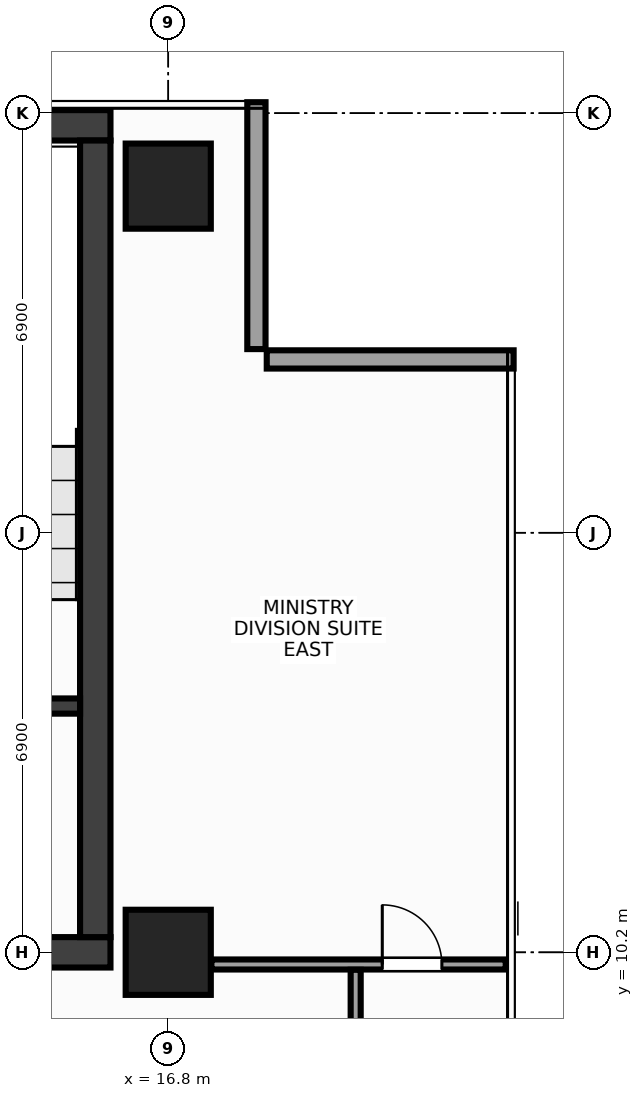
"""IFC4 building model, lengths in metres.
Left out: names, types, materials, properties, quantities, classifications, styles, units other than length and angle.
Written with IfcOpenShell. Run it as: python <this file> out.ifc"""

import sys

from ifc_helpers import new_model, si_unit, direction, frame, frame_2d, origin, origin_2d, place, context, subcontext, project, spatial, rectangle, extrude, source, transform, mapped, element, fill, save


model = new_model("IFC4")
c1 = context("Model", 3, precision=1e-05, world=origin(), true_north=direction((0.0, 1.0)))
c2 = subcontext(c1, "Body", "Model", "MODEL_VIEW")
j1 = project(units=[si_unit("LENGTHUNIT", "METRE"), si_unit("PLANEANGLEUNIT", "RADIAN")], contexts=[c1])
p1 = place(None, origin())
s1 = spatial("IfcSite", under=j1, at=p1, CompositionType="ELEMENT")
p2 = place(p1, origin())
s2 = spatial("IfcBuilding", under=s1, at=p2, CompositionType="ELEMENT")
p3 = place(p2, frame((0.0, 0.0, 261.2)))
s3 = spatial("IfcBuildingStorey", under=s2, at=p3, CompositionType="ELEMENT", Elevation=261.2)
m1 = source(origin(), c2, "Body", "SweptSolid", [
    extrude(rectangle(XDim=31.7, YDim=0.5, at=frame_2d((15.85, 0.0))), origin(), (0.0, 0.0, 1.0), 3.6),
])
p4 = place(p3, frame((-15.85, 23.8, 0.0), z_axis=(0.0, 0.0, 1.0), x_axis=(1.0, 0.0, 0.0)))
e1 = element("IfcWall", 1, at=p4, inside=s3, PredefinedType="SHEAR", context=c2, shape_type="MappedRepresentation", body=[
    mapped(m1, transform((0.0, 0.0, 0.0), x_axis=(1.0, 0.0, 0.0), y_axis=(0.0, 1.0, 0.0), z_axis=(0.0, 0.0, 1.0), scale=1.0)),
])
p5 = place(p3, frame((-15.85, 10.2, 0.0), z_axis=(0.0, 0.0, 1.0), x_axis=(1.0, 0.0, 0.0)))
e2 = element("IfcWall", 2, at=p5, inside=s3, PredefinedType="SHEAR", context=c2, shape_type="MappedRepresentation", body=[
    mapped(m1, transform((0.0, 0.0, 0.0), x_axis=(1.0, 0.0, 0.0), y_axis=(0.0, 1.0, 0.0), z_axis=(0.0, 0.0, 1.0), scale=1.0)),
])
p6 = place(p5, frame((1.7, 0.0, 0.0)))
e3 = element("IfcOpeningElement", 3, at=p6, cuts=e2, PredefinedType="OPENING", context=c2, shape_type="SweptSolid", body=[
    extrude(rectangle(XDim=1.6, YDim=2.15, at=frame_2d((0.8, 1.075))), frame((0.0, 0.262, 0.0), z_axis=(0.0, -1.0, 0.0), x_axis=(1.0, 0.0, 0.0)), (0.0, 0.0, 1.0), 0.524),
])
p7 = place(p5, frame((28.4, 0.0, 0.0)))
e4 = element("IfcOpeningElement", 4, at=p7, cuts=e2, PredefinedType="OPENING", context=c2, shape_type="SweptSolid", body=[
    extrude(rectangle(XDim=1.6, YDim=2.15, at=frame_2d((0.8, 1.075))), frame((0.0, 0.262, 0.0), z_axis=(0.0, -1.0, 0.0), x_axis=(1.0, 0.0, 0.0)), (0.0, 0.0, 1.0), 0.524),
])
p8 = place(p5, frame((15.1, 0.0, 0.0)))
e5 = element("IfcOpeningElement", 5, at=p8, cuts=e2, PredefinedType="OPENING", context=c2, shape_type="SweptSolid", body=[
    extrude(rectangle(XDim=1.5, YDim=2.2, at=frame_2d((0.75, 1.1))), frame((0.0, 0.262, 0.0), z_axis=(0.0, -1.0, 0.0), x_axis=(1.0, 0.0, 0.0)), (0.0, 0.0, 1.0), 0.524),
])
m2 = source(origin(), c2, "Body", "SweptSolid", [
    extrude(rectangle(XDim=13.1, YDim=0.5, at=frame_2d((6.55, 0.0))), origin(), (0.0, 0.0, 1.0), 3.6),
])
p9 = place(p3, frame((15.6, 10.45, 0.0), z_axis=(0.0, 0.0, 1.0), x_axis=(0.0, 1.0, 0.0)))
e6 = element("IfcWall", 6, at=p9, inside=s3, PredefinedType="SHEAR", context=c2, shape_type="MappedRepresentation", body=[
    mapped(m2, transform((0.0, 0.0, 0.0), x_axis=(1.0, 0.0, 0.0), y_axis=(0.0, 1.0, 0.0), z_axis=(0.0, 0.0, 1.0), scale=1.0)),
])
m3 = source(origin(), c2, "Body", "SweptSolid", [
    extrude(rectangle(XDim=3.705, YDim=0.25, at=frame_2d((1.853, 0.0))), origin(), (0.0, 0.0, 1.0), 3.6),
])
p10 = place(p3, frame((11.645, 14.25, 0.0), z_axis=(0.0, 0.0, 1.0), x_axis=(1.0, 0.0, 0.0)))
e7 = element("IfcWall", 7, at=p10, inside=s3, PredefinedType="SHEAR", context=c2, shape_type="MappedRepresentation", body=[
    mapped(m3, transform((0.0, 0.0, 0.0), x_axis=(1.0, 0.0, 0.0), y_axis=(0.0, 1.0, 0.0), z_axis=(0.0, 0.0, 1.0), scale=1.0)),
])
p11 = place(p10, frame((0.95, 0.0, 0.0)))
e8 = element("IfcOpeningElement", 8, at=p11, cuts=e7, PredefinedType="OPENING", context=c2, shape_type="SweptSolid", body=[
    extrude(rectangle(XDim=1.6, YDim=2.15, at=frame_2d((0.8, 1.075))), frame((0.0, 0.137, 0.0), z_axis=(0.0, -1.0, 0.0), x_axis=(1.0, 0.0, 0.0)), (0.0, 0.0, 1.0), 0.274),
])
m4 = source(origin(), c2, "Body", "SweptSolid", [
    extrude(rectangle(XDim=1.4, YDim=1.4, at=origin_2d()), origin(), (0.0, 0.0, 1.0), 3.6),
])
for number, where, z_axis, x_axis in (
    (9, (16.8, 10.2, 0.0), (0.0, 0.0, 1.0), (1.0, 0.0, 0.0)),
    (10, (16.8, 22.8, 0.0), (0.0, 0.0, 1.0), (1.0, 0.0, 0.0)),
):
    element("IfcColumn", number, at=place(p3, frame(where, z_axis=z_axis, x_axis=x_axis)), inside=s3, PredefinedType="COLUMN", context=c2, shape_type="MappedRepresentation", body=[
        mapped(m4, transform((0.0, 0.0, 0.0), x_axis=(1.0, 0.0, 0.0), y_axis=(0.0, 1.0, 0.0), z_axis=(0.0, 0.0, 1.0), scale=1.0)),
    ])
m5 = source(origin(), c2, "Body", "SweptSolid", [
    extrude(rectangle(XDim=4.06, YDim=0.3, at=frame_2d((2.03, 0.0))), origin(), (0.0, 0.0, 1.0), 2.75),
])
p12 = place(p3, frame((22.48, 19.95, 0.0), z_axis=(0.0, 0.0, 1.0), x_axis=(-1.0, 0.0, 0.0)))
e11 = element("IfcWall", 11, at=p12, inside=s3, PredefinedType="STANDARD", context=c2, shape_type="MappedRepresentation", body=[
    mapped(m5, transform((0.0, 0.0, 0.0), x_axis=(1.0, 0.0, 0.0), y_axis=(0.0, 1.0, 0.0), z_axis=(0.0, 0.0, 1.0), scale=1.0)),
])
m6 = source(origin(), c2, "Body", "SweptSolid", [
    extrude(rectangle(XDim=4.06, YDim=0.3, at=frame_2d((2.03, 0.0))), origin(), (0.0, 0.0, 1.0), 2.75),
])
p13 = place(p3, frame((18.25, 20.12, 0.0), z_axis=(0.0, 0.0, 1.0), x_axis=(0.0, 1.0, 0.0)))
e12 = element("IfcWall", 12, at=p13, inside=s3, PredefinedType="STANDARD", context=c2, shape_type="MappedRepresentation", body=[
    mapped(m6, transform((0.0, 0.0, 0.0), x_axis=(1.0, 0.0, 0.0), y_axis=(0.0, 1.0, 0.0), z_axis=(0.0, 0.0, 1.0), scale=1.0)),
])
m7 = source(origin(), c2, "Body", "SweptSolid", [
    extrude(rectangle(XDim=4.84, YDim=0.165, at=frame_2d((2.42, 0.0))), origin(), (0.0, 0.0, 1.0), 3.37),
])
p14 = place(p3, frame((17.51, 10.0, 0.0), z_axis=(0.0, 0.0, 1.0), x_axis=(1.0, 0.0, 0.0)))
e13 = element("IfcWall", 13, at=p14, inside=s3, PredefinedType="PARTITIONING", context=c2, shape_type="MappedRepresentation", body=[
    mapped(m7, transform((0.0, 0.0, 0.0), x_axis=(1.0, 0.0, 0.0), y_axis=(0.0, 1.0, 0.0), z_axis=(0.0, 0.0, 1.0), scale=1.0)),
])
p15 = place(p14, frame((2.81, 0.0, 0.0)))
e14 = element("IfcOpeningElement", 14, at=p15, cuts=e13, PredefinedType="OPENING", context=c2, shape_type="SweptSolid", body=[
    extrude(rectangle(XDim=0.98, YDim=2.15, at=frame_2d((0.49, 1.075))), frame((0.0, 0.094, 0.0), z_axis=(0.0, -1.0, 0.0), x_axis=(1.0, 0.0, 0.0)), (0.0, 0.0, 1.0), 0.189),
])
m8 = source(origin(), c2, "Body", "SweptSolid", [
    extrude(rectangle(XDim=2.108, YDim=0.165, at=frame_2d((1.054, 0.0))), origin(), (0.0, 0.0, 1.0), 3.37),
])
p16 = place(p3, frame((19.883, 7.805, 0.0), z_axis=(0.0, 0.0, 1.0), x_axis=(0.0, 1.0, 0.0)))
e15 = element("IfcWall", 15, at=p16, inside=s3, PredefinedType="PARTITIONING", context=c2, shape_type="MappedRepresentation", body=[
    mapped(m8, transform((0.0, 0.0, 0.0), x_axis=(1.0, 0.0, 0.0), y_axis=(0.0, 1.0, 0.0), z_axis=(0.0, 0.0, 1.0), scale=1.0)),
])
m9 = source(origin(), c2, "Body", "SweptSolid", [
    extrude(rectangle(XDim=0.98, YDim=2.15, at=frame_2d((0.49, 1.075))), frame((0.0, 0.025, 0.0), z_axis=(0.0, -1.0, 0.0), x_axis=(1.0, 0.0, 0.0)), (0.0, 0.0, 1.0), 0.05),
])
p17 = place(p15, origin())
e16 = element("IfcDoor", 16, at=p17, inside=s3, OperationType="SINGLE_SWING_LEFT", PredefinedType="DOOR", context=c2, shape_type="MappedRepresentation", body=[
    mapped(m9, transform((0.0, 0.0, 0.0), x_axis=(1.0, 0.0, 0.0), y_axis=(0.0, 1.0, 0.0), z_axis=(0.0, 0.0, 1.0), scale=1.0)),
])
fill(e14, e16)
save(model, sys.argv[1])
